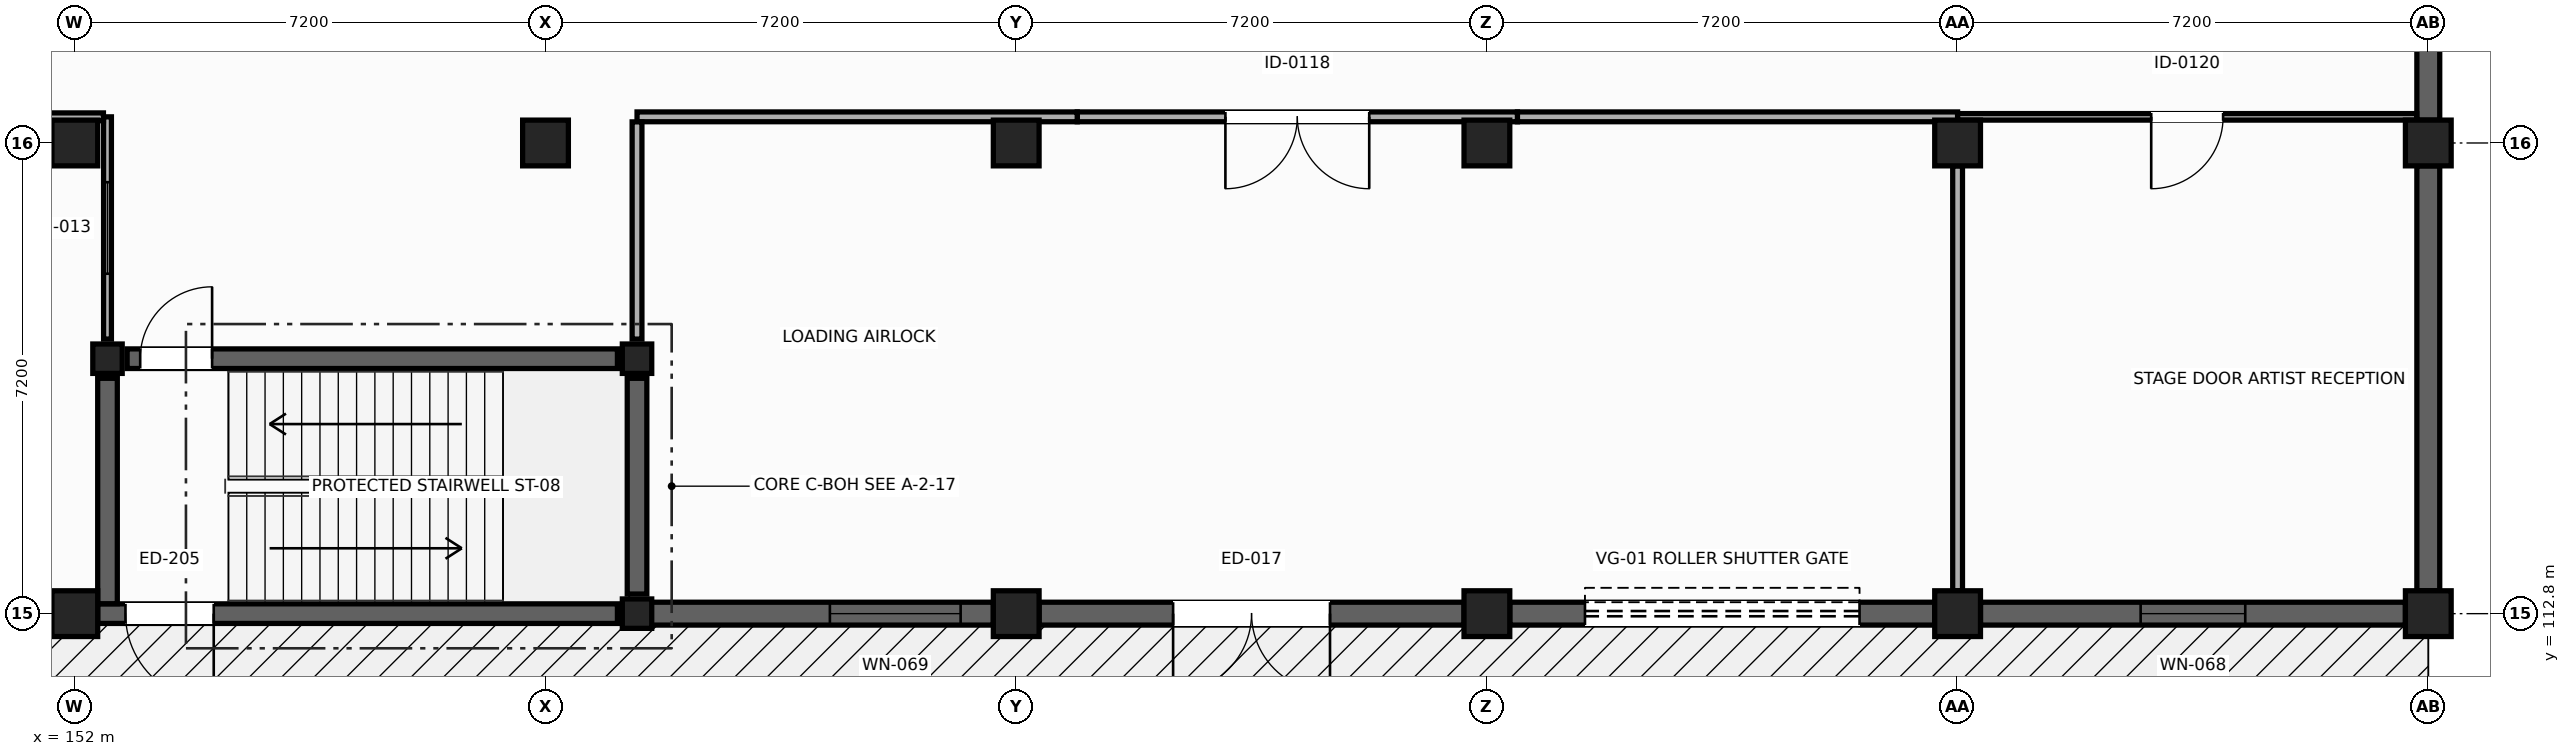
"""IFC4 building model, lengths in metres.
Left out: names, types, materials, properties, quantities, classifications, styles, units other than length and angle.
Written with IfcOpenShell. Run it as: python <this file> out.ifc"""

import sys

from ifc_helpers import new_model, si_unit, direction, frame, frame_2d, origin, origin_2d, place, context, subcontext, project, spatial, rectangle, extrude, element, fill, save


model = new_model("IFC4")
c1 = context("Model", 3, precision=1e-05, world=origin(), true_north=direction((0.0, 1.0)))
c2 = subcontext(c1, "Body", "Model", "MODEL_VIEW")
j1 = project(units=[si_unit("LENGTHUNIT", "METRE"), si_unit("PLANEANGLEUNIT", "RADIAN")], contexts=[c1])
p1 = place(None, origin())
s1 = spatial("IfcSite", under=j1, at=p1, CompositionType="ELEMENT")
p2 = place(p1, origin())
s2 = spatial("IfcBuilding", under=s1, at=p2, CompositionType="ELEMENT")
p3 = place(p2, origin())
s3 = spatial("IfcBuildingStorey", under=s2, at=p3, CompositionType="ELEMENT", Elevation=0.0)
for number, where, z_axis, x_axis in (
    (1, (152.0, 112.8, 0.0), (0.0, 0.0, 1.0), (1.0, 0.0, 0.0)),
    (2, (166.4, 112.8, 0.0), (0.0, 0.0, 1.0), (0.0, 1.0, 0.0)),
    (3, (173.6, 112.8, 0.0), (0.0, 0.0, 1.0), (1.0, 0.0, 0.0)),
    (4, (180.8, 112.8, 0.0), (0.0, 0.0, 1.0), (0.0, 1.0, 0.0)),
    (5, (188.0, 112.8, 0.0), (0.0, 0.0, 1.0), (1.0, 0.0, 0.0)),
    (6, (152.0, 120.0, 0.0), (0.0, 0.0, 1.0), (1.0, 0.0, 0.0)),
    (7, (159.2, 120.0, 0.0), (0.0, 0.0, 1.0), (0.0, 1.0, 0.0)),
    (8, (166.4, 120.0, 0.0), (0.0, 0.0, 1.0), (1.0, 0.0, 0.0)),
    (9, (173.6, 120.0, 0.0), (0.0, 0.0, 1.0), (0.0, 1.0, 0.0)),
    (10, (180.8, 120.0, 0.0), (0.0, 0.0, 1.0), (1.0, 0.0, 0.0)),
    (11, (188.0, 120.0, 0.0), (0.0, 0.0, 1.0), (1.0, 0.0, 0.0)),
):
    element("IfcColumn", number, at=place(p3, frame(where, z_axis=z_axis, x_axis=x_axis)), inside=s3, PredefinedType="COLUMN", context=c2, shape_type="SweptSolid", body=[
        extrude(rectangle(XDim=0.7, YDim=0.7, at=origin_2d()), origin(), (0.0, 0.0, 1.0), 5.4),
    ])
for number, where, z_axis, x_axis in (
    (12, (160.6, 112.8, 0.0), (0.0, 0.0, 1.0), (1.0, 0.0, 0.0)),
    (13, (160.6, 116.7, 0.0), (0.0, 0.0, 1.0), (1.0, 0.0, 0.0)),
    (14, (152.5, 116.7, 0.0), (0.0, 0.0, 1.0), (1.0, 0.0, 0.0)),
):
    element("IfcColumn", number, at=place(p3, frame(where, z_axis=z_axis, x_axis=x_axis)), inside=s3, PredefinedType="COLUMN", context=c2, shape_type="SweptSolid", body=[
        extrude(rectangle(XDim=0.45, YDim=0.45, at=origin_2d()), origin(), (0.0, 0.0, 1.0), 5.4),
    ])
p4 = place(p3, frame((187.65, 112.8, 0.0), z_axis=(0.0, 0.0, 1.0), x_axis=(-1.0, 0.0, 0.0)))
e15 = element("IfcWall", 15, at=p4, inside=s3, PredefinedType="SOLIDWALL", context=c2, shape_type="SweptSolid", body=[
    extrude(rectangle(XDim=6.5, YDim=0.35, at=frame_2d((3.25, 0.0))), origin(), (0.0, 0.0, 1.0), 5.12),
])
p5 = place(p4, frame((2.45, 0.0, 0.9)))
e16 = element("IfcOpeningElement", 16, at=p5, cuts=e15, PredefinedType="OPENING", context=c2, shape_type="SweptSolid", body=[
    extrude(rectangle(XDim=1.6, YDim=2.4, at=frame_2d((0.8, 1.2))), frame((0.0, 0.185, 0.0), z_axis=(0.0, -1.0, 0.0), x_axis=(1.0, 0.0, 0.0)), (0.0, 0.0, 1.0), 0.37),
])
p6 = place(p3, frame((180.45, 112.8, 0.0), z_axis=(0.0, 0.0, 1.0), x_axis=(-1.0, 0.0, 0.0)))
e17 = element("IfcWall", 17, at=p6, inside=s3, PredefinedType="SOLIDWALL", context=c2, shape_type="SweptSolid", body=[
    extrude(rectangle(XDim=6.5, YDim=0.35, at=frame_2d((3.25, 0.0))), origin(), (0.0, 0.0, 1.0), 5.12),
])
p7 = place(p6, frame((1.15, 0.0, 0.0)))
e18 = element("IfcOpeningElement", 18, at=p7, cuts=e17, PredefinedType="OPENING", context=c2, shape_type="SweptSolid", body=[
    extrude(rectangle(XDim=4.2, YDim=4.1, at=frame_2d((2.1, 2.05))), frame((0.0, 0.185, 0.0), z_axis=(0.0, -1.0, 0.0), x_axis=(1.0, 0.0, 0.0)), (0.0, 0.0, 1.0), 0.37),
])
p8 = place(p3, frame((173.25, 112.8, 0.0), z_axis=(0.0, 0.0, 1.0), x_axis=(-1.0, 0.0, 0.0)))
e19 = element("IfcWall", 19, at=p8, inside=s3, PredefinedType="SOLIDWALL", context=c2, shape_type="SweptSolid", body=[
    extrude(rectangle(XDim=6.5, YDim=0.35, at=frame_2d((3.25, 0.0))), origin(), (0.0, 0.0, 1.0), 5.12),
])
p9 = place(p8, frame((2.05, 0.0, 0.0)))
e20 = element("IfcOpeningElement", 20, at=p9, cuts=e19, PredefinedType="OPENING", context=c2, shape_type="SweptSolid", body=[
    extrude(rectangle(XDim=2.4, YDim=2.7, at=frame_2d((1.2, 1.35))), frame((0.0, 0.185, 0.0), z_axis=(0.0, -1.0, 0.0), x_axis=(1.0, 0.0, 0.0)), (0.0, 0.0, 1.0), 0.37),
])
p10 = place(p3, frame((166.05, 112.8, 0.0), z_axis=(0.0, 0.0, 1.0), x_axis=(-1.0, 0.0, 0.0)))
e21 = element("IfcWall", 21, at=p10, inside=s3, PredefinedType="SOLIDWALL", context=c2, shape_type="SweptSolid", body=[
    extrude(rectangle(XDim=5.3, YDim=0.35, at=frame_2d((2.65, 0.0))), origin(), (0.0, 0.0, 1.0), 5.12),
])
p11 = place(p10, frame((0.5, 0.0, 0.9)))
e22 = element("IfcOpeningElement", 22, at=p11, cuts=e21, PredefinedType="OPENING", context=c2, shape_type="SweptSolid", body=[
    extrude(rectangle(XDim=2.0, YDim=2.4, at=frame_2d((1.0, 1.2))), frame((0.0, 0.185, 0.0), z_axis=(0.0, -1.0, 0.0), x_axis=(1.0, 0.0, 0.0)), (0.0, 0.0, 1.0), 0.37),
])
p12 = place(p3, frame((188.0, 126.85, 0.0), z_axis=(0.0, 0.0, 1.0), x_axis=(0.0, -1.0, 0.0)))
e23 = element("IfcWall", 23, at=p12, inside=s3, PredefinedType="SOLIDWALL", context=c2, shape_type="SweptSolid", body=[
    extrude(rectangle(XDim=6.5, YDim=0.35, at=frame_2d((3.25, 0.0))), origin(), (0.0, 0.0, 1.0), 5.12),
])
p13 = place(p12, frame((1.6, 0.0, 0.9)))
e24 = element("IfcOpeningElement", 24, at=p13, cuts=e23, PredefinedType="OPENING", context=c2, shape_type="SweptSolid", body=[
    extrude(rectangle(XDim=2.5, YDim=1.6, at=frame_2d((1.25, 0.8))), frame((0.0, 0.185, 0.0), z_axis=(0.0, -1.0, 0.0), x_axis=(1.0, 0.0, 0.0)), (0.0, 0.0, 1.0), 0.37),
])
p14 = place(p3, frame((188.0, 119.65, 0.0), z_axis=(0.0, 0.0, 1.0), x_axis=(0.0, -1.0, 0.0)))
e25 = element("IfcWall", 25, at=p14, inside=s3, PredefinedType="SOLIDWALL", context=c2, shape_type="SweptSolid", body=[
    extrude(rectangle(XDim=6.5, YDim=0.35, at=frame_2d((3.25, 0.0))), origin(), (0.0, 0.0, 1.0), 5.12),
])
p15 = place(p3, frame((160.3, 112.8, 0.0), z_axis=(0.0, 0.0, 1.0), x_axis=(-1.0, 0.0, 0.0)))
e26 = element("IfcWall", 26, at=p15, inside=s3, PredefinedType="SHEAR", context=c2, shape_type="SweptSolid", body=[
    extrude(rectangle(XDim=7.95, YDim=0.3, at=frame_2d((3.975, 0.0))), origin(), (0.0, 0.0, 1.0), 5.12),
])
p16 = place(p15, frame((6.175, 0.0, 0.0)))
e27 = element("IfcOpeningElement", 27, at=p16, cuts=e26, PredefinedType="OPENING", context=c2, shape_type="SweptSolid", body=[
    extrude(rectangle(XDim=1.35, YDim=2.2, at=frame_2d((0.675, 1.1))), frame((0.0, 0.16, 0.0), z_axis=(0.0, -1.0, 0.0), x_axis=(1.0, 0.0, 0.0)), (0.0, 0.0, 1.0), 0.32),
])
p17 = place(p3, frame((152.5, 112.952, 0.0), z_axis=(0.0, 0.0, 1.0), x_axis=(0.0, 1.0, 0.0)))
e28 = element("IfcWall", 28, at=p17, inside=s3, PredefinedType="SHEAR", context=c2, shape_type="SweptSolid", body=[
    extrude(rectangle(XDim=3.448, YDim=0.3, at=frame_2d((1.724, 0.0))), origin(), (0.0, 0.0, 1.0), 5.12),
])
p18 = place(p3, frame((152.8, 116.7, 0.0), z_axis=(0.0, 0.0, 1.0), x_axis=(1.0, 0.0, 0.0)))
e29 = element("IfcWall", 29, at=p18, inside=s3, PredefinedType="SHEAR", context=c2, shape_type="SweptSolid", body=[
    extrude(rectangle(XDim=7.5, YDim=0.3, at=frame_2d((3.75, 0.0))), origin(), (0.0, 0.0, 1.0), 5.12),
])
p19 = place(p18, frame((0.2, 0.0, 0.0)))
e30 = element("IfcOpeningElement", 30, at=p19, cuts=e29, PredefinedType="OPENING", context=c2, shape_type="SweptSolid", body=[
    extrude(rectangle(XDim=1.1, YDim=2.15, at=frame_2d((0.55, 1.075))), frame((0.0, 0.16, 0.0), z_axis=(0.0, -1.0, 0.0), x_axis=(1.0, 0.0, 0.0)), (0.0, 0.0, 1.0), 0.32),
])
p20 = place(p3, frame((160.6, 116.4, 0.0), z_axis=(0.0, 0.0, 1.0), x_axis=(0.0, -1.0, 0.0)))
e31 = element("IfcWall", 31, at=p20, inside=s3, PredefinedType="SHEAR", context=c2, shape_type="SweptSolid", body=[
    extrude(rectangle(XDim=3.3, YDim=0.3, at=frame_2d((1.65, 0.0))), origin(), (0.0, 0.0, 1.0), 5.12),
])
p21 = place(p3, frame((180.8, 113.15, 0.0), z_axis=(0.0, 0.0, 1.0), x_axis=(0.0, 1.0, 0.0)))
e32 = element("IfcWall", 32, at=p21, inside=s3, PredefinedType="PARTITIONING", context=c2, shape_type="SweptSolid", body=[
    extrude(rectangle(XDim=6.5, YDim=0.15, at=frame_2d((3.25, 0.0))), origin(), (0.0, 0.0, 1.0), 4.315),
])
p22 = place(p3, frame((180.8, 120.4, 0.0), z_axis=(0.0, 0.0, 1.0), x_axis=(-1.0, 0.0, 0.0)))
e33 = element("IfcWall", 33, at=p22, inside=s3, PredefinedType="PARTITIONING", context=c2, shape_type="SweptSolid", body=[
    extrude(rectangle(XDim=6.733, YDim=0.15, at=frame_2d((3.367, 0.0))), origin(), (0.0, 0.0, 1.0), 4.315),
])
p23 = place(p3, frame((174.067, 120.4, 0.0), z_axis=(0.0, 0.0, 1.0), x_axis=(-1.0, 0.0, 0.0)))
e34 = element("IfcWall", 34, at=p23, inside=s3, PredefinedType="PARTITIONING", context=c2, shape_type="SweptSolid", body=[
    extrude(rectangle(XDim=6.733, YDim=0.15, at=frame_2d((3.367, 0.0))), origin(), (0.0, 0.0, 1.0), 4.315),
])
p24 = place(p23, frame((2.267, 0.0, 0.0)))
e35 = element("IfcOpeningElement", 35, at=p24, cuts=e34, PredefinedType="OPENING", context=c2, shape_type="SweptSolid", body=[
    extrude(rectangle(XDim=2.2, YDim=2.6, at=frame_2d((1.1, 1.3))), frame((0.0, 0.085, 0.0), z_axis=(0.0, -1.0, 0.0), x_axis=(1.0, 0.0, 0.0)), (0.0, 0.0, 1.0), 0.17),
])
p25 = place(p3, frame((167.333, 120.4, 0.0), z_axis=(0.0, 0.0, 1.0), x_axis=(-1.0, 0.0, 0.0)))
e36 = element("IfcWall", 36, at=p25, inside=s3, PredefinedType="PARTITIONING", context=c2, shape_type="SweptSolid", body=[
    extrude(rectangle(XDim=6.733, YDim=0.15, at=frame_2d((3.367, 0.0))), origin(), (0.0, 0.0, 1.0), 4.315),
])
p26 = place(p3, frame((160.6, 120.323, 0.0), z_axis=(0.0, 0.0, 1.0), x_axis=(0.0, -1.0, 0.0)))
e37 = element("IfcWall", 37, at=p26, inside=s3, PredefinedType="PARTITIONING", context=c2, shape_type="SweptSolid", body=[
    extrude(rectangle(XDim=3.323, YDim=0.15, at=frame_2d((1.662, 0.0))), origin(), (0.0, 0.0, 1.0), 4.315),
])
p27 = place(p3, frame((152.5, 117.0, 0.0), z_axis=(0.0, 0.0, 1.0), x_axis=(0.0, 1.0, 0.0)))
e38 = element("IfcWall", 38, at=p27, inside=s3, PredefinedType="PARTITIONING", context=c2, shape_type="SweptSolid", body=[
    extrude(rectangle(XDim=3.4, YDim=0.12, at=frame_2d((1.7, 0.0))), origin(), (0.0, 0.0, 1.0), 4.315),
])
p28 = place(p27, frame((1.0, 0.0, 1.1)))
e39 = element("IfcOpeningElement", 39, at=p28, cuts=e38, PredefinedType="OPENING", context=c2, shape_type="SweptSolid", body=[
    extrude(rectangle(XDim=1.4, YDim=1.3, at=frame_2d((0.7, 0.65))), frame((0.0, 0.07, 0.0), z_axis=(0.0, -1.0, 0.0), x_axis=(1.0, 0.0, 0.0)), (0.0, 0.0, 1.0), 0.14),
])
p29 = place(p3, frame((152.438, 120.4, 0.0), z_axis=(0.0, 0.0, 1.0), x_axis=(-1.0, 0.0, 0.0)))
e40 = element("IfcWall", 40, at=p29, inside=s3, PredefinedType="PARTITIONING", context=c2, shape_type="SweptSolid", body=[
    extrude(rectangle(XDim=7.263, YDim=0.12, at=frame_2d((3.631, 0.0))), origin(), (0.0, 0.0, 1.0), 4.315),
])
p30 = place(p3, frame((187.823, 120.4, 0.0), z_axis=(0.0, 0.0, 1.0), x_axis=(-1.0, 0.0, 0.0)))
e41 = element("IfcWall", 41, at=p30, inside=s3, PredefinedType="PARTITIONING", context=c2, shape_type="SweptSolid", body=[
    extrude(rectangle(XDim=7.023, YDim=0.1, at=frame_2d((3.511, 0.0))), origin(), (0.0, 0.0, 1.0), 4.315),
])
p31 = place(p30, frame((2.961, 0.0, 0.0)))
e42 = element("IfcOpeningElement", 42, at=p31, cuts=e41, PredefinedType="OPENING", context=c2, shape_type="SweptSolid", body=[
    extrude(rectangle(XDim=1.1, YDim=2.15, at=frame_2d((0.55, 1.075))), frame((0.0, 0.06, 0.0), z_axis=(0.0, -1.0, 0.0), x_axis=(1.0, 0.0, 0.0)), (0.0, 0.0, 1.0), 0.12),
])
p32 = place(p5, origin())
e43 = element("IfcWindow", 43, at=p32, inside=s3, PartitioningType="SINGLE_PANEL", PredefinedType="WINDOW", context=c2, shape_type="SweptSolid", body=[
    extrude(rectangle(XDim=1.6, YDim=2.4, at=frame_2d((0.8, 1.2))), frame((0.0, 0.03, 0.0), z_axis=(0.0, -1.0, 0.0), x_axis=(1.0, 0.0, 0.0)), (0.0, 0.0, 1.0), 0.06),
])
fill(e16, e43)
p33 = place(p7, origin())
e44 = element("IfcDoor", 44, at=p33, inside=s3, OperationType="ROLLINGUP", PredefinedType="GATE", context=c2, shape_type="SweptSolid", body=[
    extrude(rectangle(XDim=4.2, YDim=4.1, at=frame_2d((2.1, 2.05))), frame((0.0, 0.025, 0.0), z_axis=(0.0, -1.0, 0.0), x_axis=(1.0, 0.0, 0.0)), (0.0, 0.0, 1.0), 0.05),
])
fill(e18, e44)
p34 = place(p9, origin())
e45 = element("IfcDoor", 45, at=p34, inside=s3, OperationType="DOUBLE_DOOR_SINGLE_SWING", PredefinedType="DOOR", context=c2, shape_type="SweptSolid", body=[
    extrude(rectangle(XDim=2.4, YDim=2.7, at=frame_2d((1.2, 1.35))), frame((0.0, 0.025, 0.0), z_axis=(0.0, -1.0, 0.0), x_axis=(1.0, 0.0, 0.0)), (0.0, 0.0, 1.0), 0.05),
])
fill(e20, e45)
p35 = place(p11, origin())
e46 = element("IfcWindow", 46, at=p35, inside=s3, PartitioningType="SINGLE_PANEL", PredefinedType="WINDOW", context=c2, shape_type="SweptSolid", body=[
    extrude(rectangle(XDim=2.0, YDim=2.4, at=frame_2d((1.0, 1.2))), frame((0.0, 0.03, 0.0), z_axis=(0.0, -1.0, 0.0), x_axis=(1.0, 0.0, 0.0)), (0.0, 0.0, 1.0), 0.06),
])
fill(e22, e46)
p36 = place(p16, origin())
e47 = element("IfcDoor", 47, at=p36, inside=s3, OperationType="SINGLE_SWING_LEFT", PredefinedType="DOOR", context=c2, shape_type="SweptSolid", body=[
    extrude(rectangle(XDim=1.35, YDim=2.2, at=frame_2d((0.675, 1.1))), frame((0.0, 0.025, 0.0), z_axis=(0.0, -1.0, 0.0), x_axis=(1.0, 0.0, 0.0)), (0.0, 0.0, 1.0), 0.05),
])
fill(e27, e47)
p37 = place(p19, origin())
e48 = element("IfcDoor", 48, at=p37, inside=s3, OperationType="SINGLE_SWING_RIGHT", PredefinedType="DOOR", context=c2, shape_type="SweptSolid", body=[
    extrude(rectangle(XDim=1.1, YDim=2.15, at=frame_2d((0.55, 1.075))), frame((0.0, 0.025, 0.0), z_axis=(0.0, -1.0, 0.0), x_axis=(1.0, 0.0, 0.0)), (0.0, 0.0, 1.0), 0.05),
])
fill(e30, e48)
p38 = place(p24, origin())
e49 = element("IfcDoor", 49, at=p38, inside=s3, OperationType="DOUBLE_DOOR_SINGLE_SWING", PredefinedType="DOOR", context=c2, shape_type="SweptSolid", body=[
    extrude(rectangle(XDim=2.2, YDim=2.6, at=frame_2d((1.1, 1.3))), frame((0.0, 0.025, 0.0), z_axis=(0.0, -1.0, 0.0), x_axis=(1.0, 0.0, 0.0)), (0.0, 0.0, 1.0), 0.05),
])
fill(e35, e49)
p39 = place(p28, origin())
e50 = element("IfcWindow", 50, at=p39, inside=s3, PartitioningType="SINGLE_PANEL", PredefinedType="WINDOW", context=c2, shape_type="SweptSolid", body=[
    extrude(rectangle(XDim=1.4, YDim=1.3, at=frame_2d((0.7, 0.65))), frame((0.0, 0.03, 0.0), z_axis=(0.0, -1.0, 0.0), x_axis=(1.0, 0.0, 0.0)), (0.0, 0.0, 1.0), 0.06),
])
fill(e39, e50)
p40 = place(p31, origin())
e51 = element("IfcDoor", 51, at=p40, inside=s3, OperationType="SINGLE_SWING_RIGHT", PredefinedType="DOOR", context=c2, shape_type="SweptSolid", body=[
    extrude(rectangle(XDim=1.1, YDim=2.15, at=frame_2d((0.55, 1.075))), frame((0.0, 0.025, 0.0), z_axis=(0.0, -1.0, 0.0), x_axis=(1.0, 0.0, 0.0)), (0.0, 0.0, 1.0), 0.05),
])
fill(e42, e51)
save(model, sys.argv[1])
